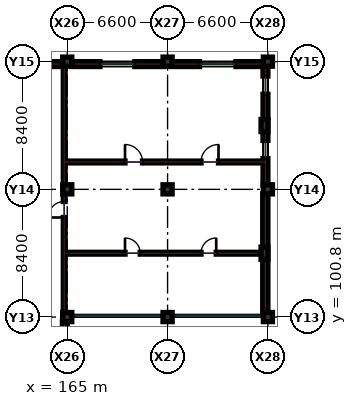
"""IFC4 building model, lengths in metres.
Left out: names, types, materials, properties, quantities, classifications, styles, units other than length and angle.
Written with IfcOpenShell. Run it as: python <this file> out.ifc"""

import sys

from ifc_helpers import new_model, si_unit, direction, frame, frame_2d, origin, origin_2d, place, context, subcontext, project, spatial, rectangle, extrude, element, fill, save


model = new_model("IFC4")
c1 = context("Model", 3, precision=1e-05, world=origin(), true_north=direction((0.0, 1.0)))
c2 = subcontext(c1, "Body", "Model", "MODEL_VIEW")
j1 = project(units=[si_unit("LENGTHUNIT", "METRE"), si_unit("PLANEANGLEUNIT", "RADIAN")], contexts=[c1])
p1 = place(None, origin())
s1 = spatial("IfcSite", under=j1, at=p1, CompositionType="ELEMENT")
p2 = place(p1, origin())
s2 = spatial("IfcBuilding", under=s1, at=p2, CompositionType="ELEMENT")
p3 = place(p2, origin())
s3 = spatial("IfcBuildingStorey", under=s2, at=p3, CompositionType="ELEMENT", Elevation=0.0)
for number, where, z_axis, x_axis in (
    (1, (165.0, 100.8, 0.0), (0.0, 0.0, 1.0), (1.0, 0.0, 0.0)),
    (2, (165.0, 109.2, 0.0), (0.0, 0.0, 1.0), (1.0, 0.0, 0.0)),
    (3, (165.0, 117.6, 0.0), (0.0, 0.0, 1.0), (1.0, 0.0, 0.0)),
    (4, (171.6, 100.8, 0.0), (0.0, 0.0, 1.0), (1.0, 0.0, 0.0)),
    (5, (171.6, 109.2, 0.0), (0.0, 0.0, 1.0), (1.0, 0.0, 0.0)),
    (6, (171.6, 117.6, 0.0), (0.0, 0.0, 1.0), (1.0, 0.0, 0.0)),
    (7, (178.2, 100.8, 0.0), (0.0, 0.0, 1.0), (1.0, 0.0, 0.0)),
    (8, (178.2, 109.2, 0.0), (0.0, 0.0, 1.0), (1.0, 0.0, 0.0)),
    (9, (178.2, 117.6, 0.0), (0.0, 0.0, 1.0), (1.0, 0.0, 0.0)),
):
    element("IfcColumn", number, at=place(p3, frame(where, z_axis=z_axis, x_axis=x_axis)), inside=s3, PredefinedType="COLUMN", context=c2, shape_type="SweptSolid", body=[
        extrude(rectangle(XDim=0.6, YDim=0.6, at=origin_2d()), origin(), (0.0, 0.0, 1.0), 5.4),
    ])
for number, where, z_axis, x_axis in (
    (10, (177.975, 105.0, 0.0), (0.0, 0.0, 1.0), (1.0, 0.0, 0.0)),
    (11, (177.975, 113.4, 0.0), (0.0, 0.0, 1.0), (1.0, 0.0, 0.0)),
):
    element("IfcColumn", number, at=place(p3, frame(where, z_axis=z_axis, x_axis=x_axis)), inside=s3, PredefinedType="PILASTER", context=c2, shape_type="SweptSolid", body=[
        extrude(rectangle(XDim=0.45, YDim=0.8, at=origin_2d()), origin(), (0.0, 0.0, 1.0), 5.4),
    ])
p4 = place(p3, frame((164.8, 100.8, 0.0), z_axis=(0.0, 0.0, 1.0), x_axis=(0.0, 1.0, 0.0)))
e12 = element("IfcWall", 12, at=p4, inside=s3, PredefinedType="PARTITIONING", context=c2, shape_type="SweptSolid", body=[
    extrude(rectangle(XDim=7.95, YDim=0.12, at=frame_2d((3.975, 0.0))), origin(), (0.0, 0.0, 1.0), 4.25),
])
p5 = place(p4, frame((6.55, 0.0, 0.0)))
e13 = element("IfcOpeningElement", 13, at=p5, cuts=e12, PredefinedType="OPENING", context=c2, shape_type="SweptSolid", body=[
    extrude(rectangle(XDim=1.05, YDim=2.15, at=frame_2d((0.525, 1.075))), frame((0.0, 0.07, 0.0), z_axis=(0.0, -1.0, 0.0), x_axis=(1.0, 0.0, 0.0)), (0.0, 0.0, 1.0), 0.14),
])
p6 = place(p3, frame((164.8, 109.65, 0.0), z_axis=(0.0, 0.0, 1.0), x_axis=(0.0, 1.0, 0.0)))
e14 = element("IfcWall", 14, at=p6, inside=s3, PredefinedType="PARTITIONING", context=c2, shape_type="SweptSolid", body=[
    extrude(rectangle(XDim=7.63, YDim=0.12, at=frame_2d((3.815, 0.0))), origin(), (0.0, 0.0, 1.0), 4.25),
])
p7 = place(p3, frame((164.8, 105.0, 0.0), z_axis=(0.0, 0.0, 1.0), x_axis=(1.0, 0.0, 0.0)))
e15 = element("IfcWall", 15, at=p7, inside=s3, PredefinedType="PARTITIONING", context=c2, shape_type="SweptSolid", body=[
    extrude(rectangle(XDim=13.2, YDim=0.12, at=frame_2d((6.6, 0.0))), origin(), (0.0, 0.0, 1.0), 4.25),
])
p8 = place(p7, frame((4.0, 0.0, 0.0)))
e16 = element("IfcOpeningElement", 16, at=p8, cuts=e15, PredefinedType="OPENING", context=c2, shape_type="SweptSolid", body=[
    extrude(rectangle(XDim=1.0, YDim=2.2, at=frame_2d((0.5, 1.1))), frame((0.0, 0.07, 0.0), z_axis=(0.0, -1.0, 0.0), x_axis=(1.0, 0.0, 0.0)), (0.0, 0.0, 1.0), 0.14),
])
p9 = place(p7, frame((9.0, 0.0, 0.0)))
e17 = element("IfcOpeningElement", 17, at=p9, cuts=e15, PredefinedType="OPENING", context=c2, shape_type="SweptSolid", body=[
    extrude(rectangle(XDim=1.0, YDim=2.2, at=frame_2d((0.5, 1.1))), frame((0.0, 0.07, 0.0), z_axis=(0.0, -1.0, 0.0), x_axis=(1.0, 0.0, 0.0)), (0.0, 0.0, 1.0), 0.14),
])
p10 = place(p3, frame((164.8, 111.0, 0.0), z_axis=(0.0, 0.0, 1.0), x_axis=(1.0, 0.0, 0.0)))
e18 = element("IfcWall", 18, at=p10, inside=s3, PredefinedType="PARTITIONING", context=c2, shape_type="SweptSolid", body=[
    extrude(rectangle(XDim=13.2, YDim=0.12, at=frame_2d((6.6, 0.0))), origin(), (0.0, 0.0, 1.0), 4.25),
])
p11 = place(p10, frame((4.0, 0.0, 0.0)))
e19 = element("IfcOpeningElement", 19, at=p11, cuts=e18, PredefinedType="OPENING", context=c2, shape_type="SweptSolid", body=[
    extrude(rectangle(XDim=1.15, YDim=2.2, at=frame_2d((0.575, 1.1))), frame((0.0, 0.07, 0.0), z_axis=(0.0, -1.0, 0.0), x_axis=(1.0, 0.0, 0.0)), (0.0, 0.0, 1.0), 0.14),
])
p12 = place(p10, frame((9.0, 0.0, 0.0)))
e20 = element("IfcOpeningElement", 20, at=p12, cuts=e18, PredefinedType="OPENING", context=c2, shape_type="SweptSolid", body=[
    extrude(rectangle(XDim=1.15, YDim=2.2, at=frame_2d((0.575, 1.1))), frame((0.0, 0.07, 0.0), z_axis=(0.0, -1.0, 0.0), x_axis=(1.0, 0.0, 0.0)), (0.0, 0.0, 1.0), 0.14),
])
p13 = place(p3, frame((164.84, 92.695, 0.0), z_axis=(0.0, 0.0, 1.0), x_axis=(0.0, 1.0, 0.0)))
e21 = element("IfcWall", 21, at=p13, inside=s3, PredefinedType="SOLIDWALL", context=c2, shape_type="SweptSolid", body=[
    extrude(rectangle(XDim=7.81, YDim=0.32, at=frame_2d((3.905, 0.0))), origin(), (0.0, 0.0, 1.0), 4.335),
])
p14 = place(p13, frame((3.155, 0.0, 0.95)))
e22 = element("IfcOpeningElement", 22, at=p14, cuts=e21, PredefinedType="OPENING", context=c2, shape_type="SweptSolid", body=[
    extrude(rectangle(XDim=1.5, YDim=2.1, at=frame_2d((0.75, 1.05))), frame((0.0, 0.17, 0.0), z_axis=(0.0, -1.0, 0.0), x_axis=(1.0, 0.0, 0.0)), (0.0, 0.0, 1.0), 0.34),
])
p15 = place(p3, frame((164.705, 117.44, 0.0), z_axis=(0.0, 0.0, 1.0), x_axis=(-1.0, 0.0, 0.0)))
e23 = element("IfcWall", 23, at=p15, inside=s3, PredefinedType="SOLIDWALL", context=c2, shape_type="SweptSolid", body=[
    extrude(rectangle(XDim=6.01, YDim=0.32, at=frame_2d((3.005, 0.0))), origin(), (0.0, 0.0, 1.0), 4.385),
])
p16 = place(p15, frame((2.005, 0.0, 0.95)))
e24 = element("IfcOpeningElement", 24, at=p16, cuts=e23, PredefinedType="OPENING", context=c2, shape_type="SweptSolid", body=[
    extrude(rectangle(XDim=2.0, YDim=1.95, at=frame_2d((1.0, 0.975))), frame((0.0, 0.17, 0.0), z_axis=(0.0, -1.0, 0.0), x_axis=(1.0, 0.0, 0.0)), (0.0, 0.0, 1.0), 0.34),
])
p17 = place(p3, frame((171.305, 117.44, 0.0), z_axis=(0.0, 0.0, 1.0), x_axis=(-1.0, 0.0, 0.0)))
e25 = element("IfcWall", 25, at=p17, inside=s3, PredefinedType="SOLIDWALL", context=c2, shape_type="SweptSolid", body=[
    extrude(rectangle(XDim=6.01, YDim=0.32, at=frame_2d((3.005, 0.0))), origin(), (0.0, 0.0, 1.0), 4.385),
])
p18 = place(p17, frame((1.855, 0.0, 0.95)))
e26 = element("IfcOpeningElement", 26, at=p18, cuts=e25, PredefinedType="OPENING", context=c2, shape_type="SweptSolid", body=[
    extrude(rectangle(XDim=2.3, YDim=1.95, at=frame_2d((1.15, 0.975))), frame((0.0, 0.17, 0.0), z_axis=(0.0, -1.0, 0.0), x_axis=(1.0, 0.0, 0.0)), (0.0, 0.0, 1.0), 0.34),
])
p19 = place(p3, frame((178.03, 101.095, 0.0), z_axis=(0.0, 0.0, 1.0), x_axis=(0.0, 1.0, 0.0)))
e27 = element("IfcWall", 27, at=p19, inside=s3, PredefinedType="SHEAR", context=c2, shape_type="SweptSolid", body=[
    extrude(rectangle(XDim=7.81, YDim=0.34, at=frame_2d((3.905, 0.0))), origin(), (0.0, 0.0, 1.0), 5.1),
])
p20 = place(p3, frame((178.04, 109.495, 0.0), z_axis=(0.0, 0.0, 1.0), x_axis=(0.0, 1.0, 0.0)))
e28 = element("IfcWall", 28, at=p20, inside=s3, PredefinedType="SOLIDWALL", context=c2, shape_type="SweptSolid", body=[
    extrude(rectangle(XDim=7.81, YDim=0.32, at=frame_2d((3.905, 0.0))), origin(), (0.0, 0.0, 1.0), 4.335),
])
p21 = place(p20, frame((1.725, 0.0, 0.95)))
e29 = element("IfcOpeningElement", 29, at=p21, cuts=e28, PredefinedType="OPENING", context=c2, shape_type="SweptSolid", body=[
    extrude(rectangle(XDim=1.2, YDim=1.5, at=frame_2d((0.6, 0.75))), frame((0.0, 0.17, 0.0), z_axis=(0.0, -1.0, 0.0), x_axis=(1.0, 0.0, 0.0)), (0.0, 0.0, 1.0), 0.34),
])
p22 = place(p20, frame((5.96, 0.0, 0.95)))
e30 = element("IfcOpeningElement", 30, at=p22, cuts=e28, PredefinedType="OPENING", context=c2, shape_type="SweptSolid", body=[
    extrude(rectangle(XDim=1.2, YDim=1.5, at=frame_2d((0.6, 0.75))), frame((0.0, 0.17, 0.0), z_axis=(0.0, -1.0, 0.0), x_axis=(1.0, 0.0, 0.0)), (0.0, 0.0, 1.0), 0.34),
])
p23 = place(p3, frame((177.905, 117.44, 0.0), z_axis=(0.0, 0.0, 1.0), x_axis=(-1.0, 0.0, 0.0)))
e31 = element("IfcWall", 31, at=p23, inside=s3, PredefinedType="SOLIDWALL", context=c2, shape_type="SweptSolid", body=[
    extrude(rectangle(XDim=6.01, YDim=0.32, at=frame_2d((3.005, 0.0))), origin(), (0.0, 0.0, 1.0), 4.385),
])
p24 = place(p23, frame((1.805, 0.0, 0.95)))
e32 = element("IfcOpeningElement", 32, at=p24, cuts=e31, PredefinedType="OPENING", context=c2, shape_type="SweptSolid", body=[
    extrude(rectangle(XDim=2.4, YDim=1.6, at=frame_2d((1.2, 0.8))), frame((0.0, 0.17, 0.0), z_axis=(0.0, -1.0, 0.0), x_axis=(1.0, 0.0, 0.0)), (0.0, 0.0, 1.0), 0.34),
])
p25 = place(p5, origin())
e33 = element("IfcDoor", 33, at=p25, inside=s3, OperationType="SINGLE_SWING_LEFT", PredefinedType="DOOR", context=c2, shape_type="SweptSolid", body=[
    extrude(rectangle(XDim=1.05, YDim=2.15, at=frame_2d((0.525, 1.075))), frame((0.0, 0.025, 0.0), z_axis=(0.0, -1.0, 0.0), x_axis=(1.0, 0.0, 0.0)), (0.0, 0.0, 1.0), 0.05),
])
fill(e13, e33)
p26 = place(p8, origin())
e34 = element("IfcDoor", 34, at=p26, inside=s3, OperationType="SINGLE_SWING_LEFT", PredefinedType="DOOR", context=c2, shape_type="SweptSolid", body=[
    extrude(rectangle(XDim=1.0, YDim=2.2, at=frame_2d((0.5, 1.1))), frame((0.0, 0.025, 0.0), z_axis=(0.0, -1.0, 0.0), x_axis=(1.0, 0.0, 0.0)), (0.0, 0.0, 1.0), 0.05),
])
fill(e16, e34)
p27 = place(p9, origin())
e35 = element("IfcDoor", 35, at=p27, inside=s3, OperationType="SINGLE_SWING_RIGHT", PredefinedType="DOOR", context=c2, shape_type="SweptSolid", body=[
    extrude(rectangle(XDim=1.0, YDim=2.2, at=frame_2d((0.5, 1.1))), frame((0.0, 0.025, 0.0), z_axis=(0.0, -1.0, 0.0), x_axis=(1.0, 0.0, 0.0)), (0.0, 0.0, 1.0), 0.05),
])
fill(e17, e35)
p28 = place(p11, origin())
e36 = element("IfcDoor", 36, at=p28, inside=s3, OperationType="SINGLE_SWING_LEFT", PredefinedType="DOOR", context=c2, shape_type="SweptSolid", body=[
    extrude(rectangle(XDim=1.15, YDim=2.2, at=frame_2d((0.575, 1.1))), frame((0.0, 0.025, 0.0), z_axis=(0.0, -1.0, 0.0), x_axis=(1.0, 0.0, 0.0)), (0.0, 0.0, 1.0), 0.05),
])
fill(e19, e36)
p29 = place(p12, origin())
e37 = element("IfcDoor", 37, at=p29, inside=s3, OperationType="SINGLE_SWING_RIGHT", PredefinedType="DOOR", context=c2, shape_type="SweptSolid", body=[
    extrude(rectangle(XDim=1.15, YDim=2.2, at=frame_2d((0.575, 1.1))), frame((0.0, 0.025, 0.0), z_axis=(0.0, -1.0, 0.0), x_axis=(1.0, 0.0, 0.0)), (0.0, 0.0, 1.0), 0.05),
])
fill(e20, e37)
p30 = place(p18, origin())
e38 = element("IfcWindow", 38, at=p30, inside=s3, PartitioningType="SINGLE_PANEL", PredefinedType="WINDOW", context=c2, shape_type="SweptSolid", body=[
    extrude(rectangle(XDim=2.3, YDim=1.95, at=frame_2d((1.15, 0.975))), frame((0.0, 0.03, 0.0), z_axis=(0.0, -1.0, 0.0), x_axis=(1.0, 0.0, 0.0)), (0.0, 0.0, 1.0), 0.06),
])
fill(e26, e38)
p31 = place(p21, origin())
e39 = element("IfcWindow", 39, at=p31, inside=s3, PartitioningType="SINGLE_PANEL", PredefinedType="WINDOW", context=c2, shape_type="SweptSolid", body=[
    extrude(rectangle(XDim=1.2, YDim=1.5, at=frame_2d((0.6, 0.75))), frame((0.0, 0.03, 0.0), z_axis=(0.0, -1.0, 0.0), x_axis=(1.0, 0.0, 0.0)), (0.0, 0.0, 1.0), 0.06),
])
fill(e29, e39)
p32 = place(p22, origin())
e40 = element("IfcWindow", 40, at=p32, inside=s3, PartitioningType="SINGLE_PANEL", PredefinedType="WINDOW", context=c2, shape_type="SweptSolid", body=[
    extrude(rectangle(XDim=1.2, YDim=1.5, at=frame_2d((0.6, 0.75))), frame((0.0, 0.03, 0.0), z_axis=(0.0, -1.0, 0.0), x_axis=(1.0, 0.0, 0.0)), (0.0, 0.0, 1.0), 0.06),
])
fill(e30, e40)
p33 = place(p24, origin())
e41 = element("IfcWindow", 41, at=p33, inside=s3, PartitioningType="SINGLE_PANEL", PredefinedType="WINDOW", context=c2, shape_type="SweptSolid", body=[
    extrude(rectangle(XDim=2.4, YDim=1.6, at=frame_2d((1.2, 0.8))), frame((0.0, 0.03, 0.0), z_axis=(0.0, -1.0, 0.0), x_axis=(1.0, 0.0, 0.0)), (0.0, 0.0, 1.0), 0.06),
])
fill(e32, e41)
save(model, sys.argv[1])
